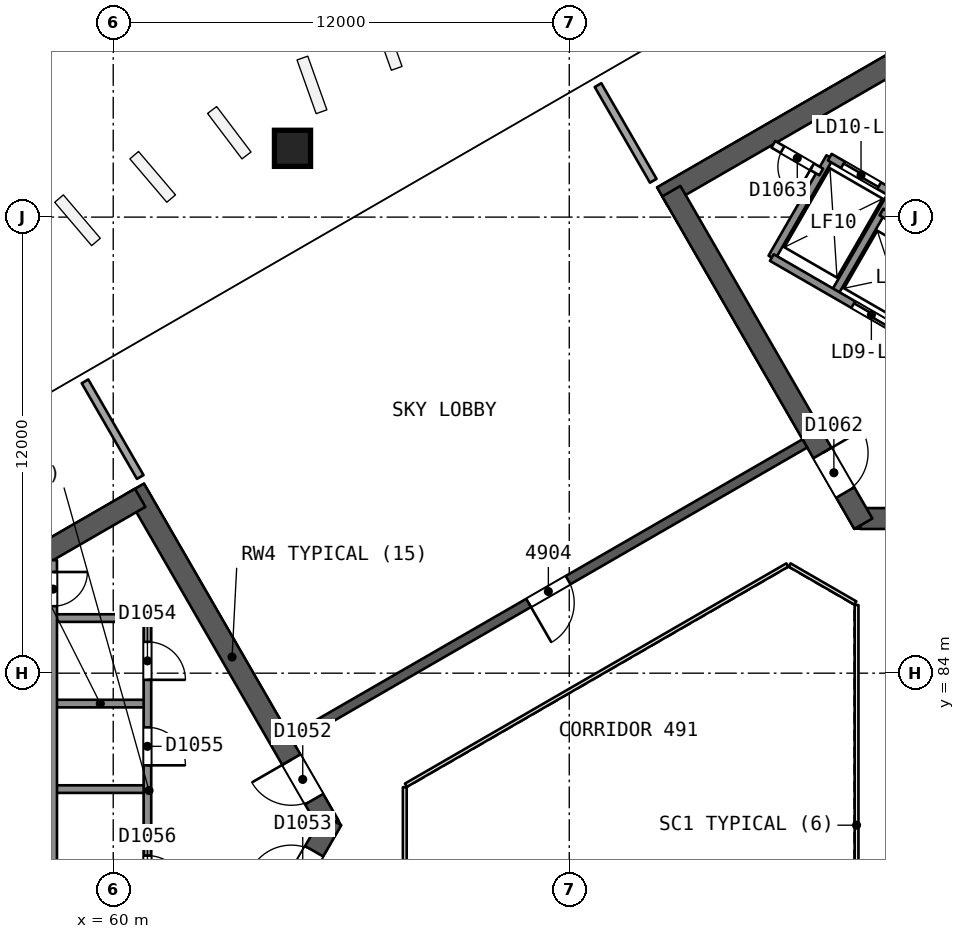
"""IFC4 building model, lengths in metres.
Left out: names, types, materials, properties, quantities, classifications, styles, units other than length and angle.
Written with IfcOpenShell. Run it as: python <this file> out.ifc"""

import sys

from ifc_helpers import new_model, si_unit, direction, frame, frame_2d, origin, origin_2d, place, context, subcontext, project, spatial, rectangle, extrude, element, fill, save


model = new_model("IFC4")
c1 = context("Model", 3, precision=1e-05, world=origin(), true_north=direction((0.0, 1.0)))
c2 = subcontext(c1, "Body", "Model", "MODEL_VIEW")
j1 = project(units=[si_unit("LENGTHUNIT", "METRE"), si_unit("PLANEANGLEUNIT", "RADIAN")], contexts=[c1])
p1 = place(None, origin())
s1 = spatial("IfcSite", under=j1, at=p1, CompositionType="ELEMENT")
p2 = place(p1, origin())
s2 = spatial("IfcBuilding", under=s1, at=p2, CompositionType="ELEMENT")
p3 = place(p2, frame((0.0, 0.0, 201.4)))
s3 = spatial("IfcBuildingStorey", under=s2, at=p3, CompositionType="ELEMENT", Elevation=201.4)
p4 = place(p3, frame((65.682, 80.0, 0.0), z_axis=(0.0, 0.0, 1.0), x_axis=(-0.500000202252, 0.866025287014, 0.0)))
e1 = element("IfcWall", 1, at=p4, inside=s3, PredefinedType="SHEAR", context=c2, shape_type="SweptSolid", body=[
    extrude(rectangle(XDim=10.221, YDim=0.55, at=frame_2d((5.111, 0.0))), origin(), (0.0, 0.0, 1.0), 4.4),
])
p5 = place(p4, frame((0.791, 0.0, 0.0)))
e2 = element("IfcOpeningElement", 2, at=p5, cuts=e1, PredefinedType="OPENING", context=c2, shape_type="SweptSolid", body=[
    extrude(rectangle(XDim=1.2, YDim=2.1, at=frame_2d((0.6, 1.05))), frame((0.0, 0.286, 0.0), z_axis=(0.0, -1.0, 0.0), x_axis=(1.0, 0.0, 0.0)), (0.0, 0.0, 1.0), 0.571),
])
p6 = place(p3, frame((60.709, 88.614, 0.0), z_axis=(0.0, 0.0, 1.0), x_axis=(-0.866020164116, -0.500009075263, 0.0)))
e3 = element("IfcWall", 3, at=p6, inside=s3, PredefinedType="SHEAR", context=c2, shape_type="SweptSolid", body=[
    extrude(rectangle(XDim=14.058, YDim=0.55, at=frame_2d((7.029, 0.0))), origin(), (0.0, 0.0, 1.0), 4.4),
])
p7 = place(p3, frame((60.709, 71.386, 0.0), z_axis=(0.0, 0.0, 1.0), x_axis=(0.500015938302, 0.866016201606, 0.0)))
e4 = element("IfcWall", 4, at=p7, inside=s3, PredefinedType="SHEAR", context=c2, shape_type="SweptSolid", body=[
    extrude(rectangle(XDim=10.105, YDim=0.55, at=frame_2d((5.053, 0.0))), origin(), (0.0, 0.0, 1.0), 4.4),
])
p8 = place(p7, frame((7.955, 0.0, 0.0)))
e5 = element("IfcOpeningElement", 5, at=p8, cuts=e4, PredefinedType="OPENING", context=c2, shape_type="SweptSolid", body=[
    extrude(rectangle(XDim=1.2, YDim=2.1, at=frame_2d((0.6, 1.05))), frame((0.0, 0.286, 0.0), z_axis=(0.0, -1.0, 0.0), x_axis=(1.0, 0.0, 0.0)), (0.0, 0.0, 1.0), 0.571),
])
p9 = place(p3, frame((79.659, 88.069, 0.0), z_axis=(0.0, 0.0, 1.0), x_axis=(1.0, 0.0, 0.0)))
e6 = element("IfcWall", 6, at=p9, inside=s3, PredefinedType="SHEAR", context=c2, shape_type="SweptSolid", body=[
    extrude(rectangle(XDim=10.221, YDim=0.55, at=frame_2d((5.111, 0.0))), origin(), (0.0, 0.0, 1.0), 4.4),
])
p10 = place(p9, frame((0.791, 0.0, 0.0)))
e7 = element("IfcOpeningElement", 7, at=p10, cuts=e6, PredefinedType="OPENING", context=c2, shape_type="SweptSolid", body=[
    extrude(rectangle(XDim=1.2, YDim=2.1, at=frame_2d((0.6, 1.05))), frame((0.0, 0.286, 0.0), z_axis=(0.0, -1.0, 0.0), x_axis=(1.0, 0.0, 0.0)), (0.0, 0.0, 1.0), 0.571),
])
p11 = place(p3, frame((86.723, 103.633, 0.0), z_axis=(0.0, 0.0, 1.0), x_axis=(-0.866023530946, -0.500003243837, 0.0)))
e8 = element("IfcWall", 8, at=p11, inside=s3, PredefinedType="SHEAR", context=c2, shape_type="SweptSolid", body=[
    extrude(rectangle(XDim=14.175, YDim=0.55, at=frame_2d((7.087, 0.0))), origin(), (0.0, 0.0, 1.0), 4.4),
])
p12 = place(p3, frame((74.686, 96.683, 0.0), z_axis=(0.0, 0.0, 1.0), x_axis=(0.499997818338, -0.866026663364, 0.0)))
e9 = element("IfcWall", 9, at=p12, inside=s3, PredefinedType="SHEAR", context=c2, shape_type="SweptSolid", body=[
    extrude(rectangle(XDim=10.105, YDim=0.55, at=frame_2d((5.052, 0.0))), origin(), (0.0, 0.0, 1.0), 4.4),
])
p13 = place(p12, frame((7.955, 0.0, 0.0)))
e10 = element("IfcOpeningElement", 10, at=p13, cuts=e9, PredefinedType="OPENING", context=c2, shape_type="SweptSolid", body=[
    extrude(rectangle(XDim=1.2, YDim=2.1, at=frame_2d((0.6, 1.05))), frame((0.0, 0.286, 0.0), z_axis=(0.0, -1.0, 0.0), x_axis=(1.0, 0.0, 0.0)), (0.0, 0.0, 1.0), 0.571),
])
p14 = place(p3, frame((78.2, 90.046, 0.0), z_axis=(0.0, 0.0, 1.0), x_axis=(-0.866026492143, -0.499998114903, 0.0)))
e11 = element("IfcWall", 11, at=p14, inside=s3, PredefinedType="SHEAR", context=c2, shape_type="SweptSolid", body=[
    extrude(rectangle(XDim=15.588, YDim=0.25, at=frame_2d((7.794, 0.0))), origin(), (0.0, 0.0, 1.0), 4.0),
])
p15 = place(p14, frame((7.194, 0.0, 0.0)))
e12 = element("IfcOpeningElement", 12, at=p15, cuts=e11, PredefinedType="OPENING", context=c2, shape_type="SweptSolid", body=[
    extrude(rectangle(XDim=1.2, YDim=2.4, at=frame_2d((0.6, 1.2))), frame((0.0, 0.135, 0.0), z_axis=(0.0, -1.0, 0.0), x_axis=(1.0, 0.0, 0.0)), (0.0, 0.0, 1.0), 0.271),
])
p16 = place(p3, frame((64.705, 97.831, 0.0), z_axis=(0.010096151254, -0.017474107939, 0.999796340902), x_axis=(-0.500171963961, 0.865690897347, 0.020181098047)))
e13 = element("IfcColumn", 13, at=p16, inside=s3, PredefinedType="COLUMN", context=c2, shape_type="SweptSolid", body=[
    extrude(rectangle(XDim=0.95, YDim=0.95, at=origin_2d()), origin(), (0.0, 0.0, 1.0), 4.401),
])
for number, where, z_axis, x_axis in (
    (14, (60.71, 89.162, 0.0), (0.0, 0.0, 1.0), (-0.5, 0.866, 0.0)),
    (15, (72.757, 99.473, 0.0), (0.0, 0.0, 1.0), (0.5, -0.866, 0.0)),
):
    element("IfcWall", number, at=place(p3, frame(where, z_axis=z_axis, x_axis=x_axis)), inside=s3, PredefinedType="PARTITIONING", context=c2, shape_type="SweptSolid", body=[
        extrude(rectangle(XDim=2.907, YDim=0.2, at=frame_2d((1.453, 0.0))), origin(), (0.0, 0.0, 1.0), 4.0),
    ])
for number, where, z_axis, x_axis in (
    (16, (60.9, 85.45, 0.0), (0.0, 0.0, 1.0), (-1.0, 0.0, 0.0)),
    (17, (60.9, 83.2, 0.0), (0.0, 0.0, 1.0), (-1.0, 0.0, 0.0)),
):
    element("IfcWall", number, at=place(p3, frame(where, z_axis=z_axis, x_axis=x_axis)), inside=s3, PredefinedType="SOLIDWALL", context=c2, shape_type="SweptSolid", body=[
        extrude(rectangle(XDim=2.48, YDim=0.2, at=frame_2d((1.24, 0.0))), origin(), (0.0, 0.0, 1.0), 4.0),
    ])
p17 = place(p3, frame((58.42, 82.075, 0.0), z_axis=(0.0, 0.0, 1.0), x_axis=(-1.0, 0.0, 0.0)))
e18 = element("IfcWall", 18, at=p17, inside=s3, PredefinedType="SOLIDWALL", context=c2, shape_type="SweptSolid", body=[
    extrude(rectangle(XDim=7.7, YDim=0.2, at=frame_2d((3.85, 0.0))), origin(), (0.0, 0.0, 1.0), 4.0),
])
p18 = place(p3, frame((60.9, 80.95, 0.0), z_axis=(0.0, 0.0, 1.0), x_axis=(-1.0, 0.0, 0.0)))
e19 = element("IfcWall", 19, at=p18, inside=s3, PredefinedType="SOLIDWALL", context=c2, shape_type="SweptSolid", body=[
    extrude(rectangle(XDim=2.48, YDim=0.2, at=frame_2d((1.24, 0.0))), origin(), (0.0, 0.0, 1.0), 4.0),
])
p19 = place(p3, frame((60.9, 85.45, 0.0), z_axis=(0.0, 0.0, 1.0), x_axis=(0.0, -1.0, 0.0)))
e20 = element("IfcWall", 20, at=p19, inside=s3, PredefinedType="SOLIDWALL", context=c2, shape_type="SweptSolid", body=[
    extrude(rectangle(XDim=10.9, YDim=0.2, at=frame_2d((5.45, 0.0))), origin(), (0.0, 0.0, 1.0), 4.0),
])
p20 = place(p19, frame((0.625, 0.0, 0.0)))
e21 = element("IfcOpeningElement", 21, at=p20, cuts=e20, PredefinedType="OPENING", context=c2, shape_type="SweptSolid", body=[
    extrude(rectangle(XDim=1.0, YDim=2.1, at=frame_2d((0.5, 1.05))), frame((0.0, 0.11, 0.0), z_axis=(0.0, -1.0, 0.0), x_axis=(1.0, 0.0, 0.0)), (0.0, 0.0, 1.0), 0.221),
])
p21 = place(p19, frame((2.875, 0.0, 0.0)))
e22 = element("IfcOpeningElement", 22, at=p21, cuts=e20, PredefinedType="OPENING", context=c2, shape_type="SweptSolid", body=[
    extrude(rectangle(XDim=1.0, YDim=2.1, at=frame_2d((0.5, 1.05))), frame((0.0, 0.11, 0.0), z_axis=(0.0, -1.0, 0.0), x_axis=(1.0, 0.0, 0.0)), (0.0, 0.0, 1.0), 0.221),
])
p22 = place(p19, frame((6.25, 0.0, 0.0)))
e23 = element("IfcOpeningElement", 23, at=p22, cuts=e20, PredefinedType="OPENING", context=c2, shape_type="SweptSolid", body=[
    extrude(rectangle(XDim=1.0, YDim=2.1, at=frame_2d((0.5, 1.05))), frame((0.0, 0.11, 0.0), z_axis=(0.0, -1.0, 0.0), x_axis=(1.0, 0.0, 0.0)), (0.0, 0.0, 1.0), 0.221),
])
p23 = place(p3, frame((58.42, 86.974, 0.0), z_axis=(0.0, 0.0, 1.0), x_axis=(0.0, -1.0, 0.0)))
e24 = element("IfcWall", 24, at=p23, inside=s3, PredefinedType="SOLIDWALL", context=c2, shape_type="SweptSolid", body=[
    extrude(rectangle(XDim=10.524, YDim=0.2, at=frame_2d((5.262, 0.0))), origin(), (0.0, 0.0, 1.0), 4.0),
])
p24 = place(p23, frame((0.312, 0.0, 0.0)))
e25 = element("IfcOpeningElement", 25, at=p24, cuts=e24, PredefinedType="OPENING", context=c2, shape_type="SweptSolid", body=[
    extrude(rectangle(XDim=0.9, YDim=2.1, at=frame_2d((0.45, 1.05))), frame((0.0, 0.11, 0.0), z_axis=(0.0, -1.0, 0.0), x_axis=(1.0, 0.0, 0.0)), (0.0, 0.0, 1.0), 0.221),
])
for number, where, z_axis, x_axis in (
    (26, (78.976, 93.986, 0.0), (0.0, 0.0, 1.0), (0.5, 0.866, 0.0)),
    (27, (77.33, 94.936, 0.0), (0.0, 0.0, 1.0), (0.5, 0.866, 0.0)),
):
    element("IfcWall", number, at=place(p3, frame(where, z_axis=z_axis, x_axis=x_axis)), inside=s3, PredefinedType="SOLIDWALL", context=c2, shape_type="SweptSolid", body=[
        extrude(rectangle(XDim=3.05, YDim=0.2, at=frame_2d((1.525, 0.0))), origin(), (0.0, 0.0, 1.0), 4.0),
    ])
p25 = place(p3, frame((86.77, 89.486, 0.0), z_axis=(0.0, 0.0, 1.0), x_axis=(-0.86601811187, 0.500012629753, 0.0)))
e28 = element("IfcWall", 28, at=p25, inside=s3, PredefinedType="SOLIDWALL", context=c2, shape_type="SweptSolid", body=[
    extrude(rectangle(XDim=10.9, YDim=0.2, at=frame_2d((5.45, 0.0))), origin(), (0.0, 0.0, 1.0), 4.0),
])
p26 = place(p25, frame((0.575, 0.0, 0.0)))
e29 = element("IfcOpeningElement", 29, at=p26, cuts=e28, PredefinedType="OPENING", context=c2, shape_type="SweptSolid", body=[
    extrude(rectangle(XDim=1.1, YDim=2.1, at=frame_2d((0.55, 1.05))), frame((0.0, 0.11, 0.0), z_axis=(0.0, -1.0, 0.0), x_axis=(1.0, 0.0, 0.0)), (0.0, 0.0, 1.0), 0.221),
])
p27 = place(p25, frame((2.825, 0.0, 0.0)))
e30 = element("IfcOpeningElement", 30, at=p27, cuts=e28, PredefinedType="OPENING", context=c2, shape_type="SweptSolid", body=[
    extrude(rectangle(XDim=1.1, YDim=2.1, at=frame_2d((0.55, 1.05))), frame((0.0, 0.11, 0.0), z_axis=(0.0, -1.0, 0.0), x_axis=(1.0, 0.0, 0.0)), (0.0, 0.0, 1.0), 0.221),
])
p28 = place(p25, frame((5.075, 0.0, 0.0)))
e31 = element("IfcOpeningElement", 31, at=p28, cuts=e28, PredefinedType="OPENING", context=c2, shape_type="SweptSolid", body=[
    extrude(rectangle(XDim=1.1, YDim=2.1, at=frame_2d((0.55, 1.05))), frame((0.0, 0.11, 0.0), z_axis=(0.0, -1.0, 0.0), x_axis=(1.0, 0.0, 0.0)), (0.0, 0.0, 1.0), 0.221),
])
p29 = place(p25, frame((7.325, 0.0, 0.0)))
e32 = element("IfcOpeningElement", 32, at=p29, cuts=e28, PredefinedType="OPENING", context=c2, shape_type="SweptSolid", body=[
    extrude(rectangle(XDim=1.1, YDim=2.1, at=frame_2d((0.55, 1.05))), frame((0.0, 0.11, 0.0), z_axis=(0.0, -1.0, 0.0), x_axis=(1.0, 0.0, 0.0)), (0.0, 0.0, 1.0), 0.221),
])
p30 = place(p3, frame((89.33, 90.872, 0.0), z_axis=(0.0, 0.0, 1.0), x_axis=(-0.866027589512, 0.49999621419, 0.0)))
e33 = element("IfcWall", 33, at=p30, inside=s3, PredefinedType="SOLIDWALL", context=c2, shape_type="SweptSolid", body=[
    extrude(rectangle(XDim=10.524, YDim=0.2, at=frame_2d((5.262, 0.0))), origin(), (0.0, 0.0, 1.0), 4.0),
])
p31 = place(p30, frame((0.312, 0.0, 0.0)))
e34 = element("IfcOpeningElement", 34, at=p31, cuts=e33, PredefinedType="OPENING", context=c2, shape_type="SweptSolid", body=[
    extrude(rectangle(XDim=0.9, YDim=2.1, at=frame_2d((0.45, 1.05))), frame((0.0, 0.11, 0.0), z_axis=(0.0, -1.0, 0.0), x_axis=(1.0, 0.0, 0.0)), (0.0, 0.0, 1.0), 0.221),
])
p32 = place(p3, frame((78.63, 97.188, 0.0), z_axis=(0.0, 0.0, 1.0), x_axis=(-0.866003949776, 0.500037157592, 0.0)))
e35 = element("IfcWall", 35, at=p32, inside=s3, PredefinedType="PARTITIONING", context=c2, shape_type="SweptSolid", body=[
    extrude(rectangle(XDim=1.455, YDim=0.2, at=frame_2d((0.728, 0.0))), origin(), (0.0, 0.0, 1.0), 4.0),
])
p33 = place(p32, frame((0.278, 0.0, 0.0)))
e36 = element("IfcOpeningElement", 36, at=p33, cuts=e35, PredefinedType="OPENING", context=c2, shape_type="SweptSolid", body=[
    extrude(rectangle(XDim=0.9, YDim=2.1, at=frame_2d((0.45, 1.05))), frame((0.0, 0.11, 0.0), z_axis=(0.0, -1.0, 0.0), x_axis=(1.0, 0.0, 0.0)), (0.0, 0.0, 1.0), 0.221),
])
p34 = place(p3, frame((80.5, 96.627, 0.0), z_axis=(0.0, 0.0, 1.0), x_axis=(-0.86601224135, 0.500022797313, 0.0)))
e37 = element("IfcWall", 37, at=p34, inside=s3, PredefinedType="SOLIDWALL", context=c2, shape_type="SweptSolid", body=[
    extrude(rectangle(XDim=1.9, YDim=0.2, at=frame_2d((0.95, 0.0))), origin(), (0.0, 0.0, 1.0), 4.0),
])
p35 = place(p34, frame((0.4, 0.0, 0.0)))
e38 = element("IfcOpeningElement", 38, at=p35, cuts=e37, PredefinedType="OPENING", context=c2, shape_type="SweptSolid", body=[
    extrude(rectangle(XDim=1.1, YDim=2.1, at=frame_2d((0.55, 1.05))), frame((0.0, 0.11, 0.0), z_axis=(0.0, -1.0, 0.0), x_axis=(1.0, 0.0, 0.0)), (0.0, 0.0, 1.0), 0.221),
])
p36 = place(p3, frame((79.56, 74.206, 0.0), z_axis=(0.0, 0.0, 1.0), x_axis=(0.0, 1.0, 0.0)))
e39 = element("IfcWall", 39, at=p36, inside=s3, PredefinedType="PARTITIONING", context=c2, shape_type="SweptSolid", body=[
    extrude(rectangle(XDim=11.588, YDim=0.1, at=frame_2d((5.794, 0.0))), origin(), (0.0, 0.0, 1.0), 4.0),
])
p37 = place(p3, frame((79.53, 85.846, 0.0), z_axis=(0.0, 0.0, 1.0), x_axis=(-0.866041268327, 0.499972520799, 0.0)))
e40 = element("IfcWall", 40, at=p37, inside=s3, PredefinedType="PARTITIONING", context=c2, shape_type="SweptSolid", body=[
    extrude(rectangle(XDim=2.0, YDim=0.1, at=frame_2d((1.0, 0.0))), origin(), (0.0, 0.0, 1.0), 4.0),
])
p38 = place(p3, frame((77.738, 86.846, 0.0), z_axis=(0.0, 0.0, 1.0), x_axis=(-0.866026658274, -0.499997827154, 0.0)))
e41 = element("IfcWall", 41, at=p38, inside=s3, PredefinedType="PARTITIONING", context=c2, shape_type="SweptSolid", body=[
    extrude(rectangle(XDim=11.588, YDim=0.1, at=frame_2d((5.794, 0.0))), origin(), (0.0, 0.0, 1.0), 4.0),
])
p39 = place(p3, frame((67.672, 81.0, 0.0), z_axis=(0.0, 0.0, 1.0), x_axis=(0.0, -1.0, 0.0)))
e42 = element("IfcWall", 42, at=p39, inside=s3, PredefinedType="PARTITIONING", context=c2, shape_type="SweptSolid", body=[
    extrude(rectangle(XDim=2.0, YDim=0.1, at=frame_2d((1.0, 0.0))), origin(), (0.0, 0.0, 1.0), 4.0),
])
p40 = place(p15, origin())
e43 = element("IfcDoor", 43, at=p40, inside=s3, OperationType="SINGLE_SWING_RIGHT", PredefinedType="NOTDEFINED", context=c2, shape_type="SweptSolid", body=[
    extrude(rectangle(XDim=1.2, YDim=2.4, at=frame_2d((0.6, 1.2))), frame((0.0, 0.025, 0.0), z_axis=(0.0, -1.0, 0.0), x_axis=(1.0, 0.0, 0.0)), (0.0, 0.0, 1.0), 0.05),
])
fill(e12, e43)
p41 = place(p5, origin())
e44 = element("IfcDoor", 44, at=p41, inside=s3, OperationType="SINGLE_SWING_RIGHT", PredefinedType="NOTDEFINED", context=c2, shape_type="SweptSolid", body=[
    extrude(rectangle(XDim=1.2, YDim=2.1, at=frame_2d((0.6, 1.05))), frame((0.0, 0.025, 0.0), z_axis=(0.0, -1.0, 0.0), x_axis=(1.0, 0.0, 0.0)), (0.0, 0.0, 1.0), 0.05),
])
fill(e2, e44)
p42 = place(p8, origin())
e45 = element("IfcDoor", 45, at=p42, inside=s3, OperationType="SINGLE_SWING_LEFT", PredefinedType="NOTDEFINED", context=c2, shape_type="SweptSolid", body=[
    extrude(rectangle(XDim=1.2, YDim=2.1, at=frame_2d((0.6, 1.05))), frame((0.0, 0.025, 0.0), z_axis=(0.0, -1.0, 0.0), x_axis=(1.0, 0.0, 0.0)), (0.0, 0.0, 1.0), 0.05),
])
fill(e5, e45)
p43 = place(p20, origin())
e46 = element("IfcDoor", 46, at=p43, inside=s3, OperationType="SINGLE_SWING_RIGHT", PredefinedType="NOTDEFINED", context=c2, shape_type="SweptSolid", body=[
    extrude(rectangle(XDim=1.0, YDim=2.1, at=frame_2d((0.5, 1.05))), frame((0.0, 0.025, 0.0), z_axis=(0.0, -1.0, 0.0), x_axis=(1.0, 0.0, 0.0)), (0.0, 0.0, 1.0), 0.05),
])
fill(e21, e46)
p44 = place(p21, origin())
e47 = element("IfcDoor", 47, at=p44, inside=s3, OperationType="SINGLE_SWING_RIGHT", PredefinedType="NOTDEFINED", context=c2, shape_type="SweptSolid", body=[
    extrude(rectangle(XDim=1.0, YDim=2.1, at=frame_2d((0.5, 1.05))), frame((0.0, 0.025, 0.0), z_axis=(0.0, -1.0, 0.0), x_axis=(1.0, 0.0, 0.0)), (0.0, 0.0, 1.0), 0.05),
])
fill(e22, e47)
p45 = place(p22, origin())
e48 = element("IfcDoor", 48, at=p45, inside=s3, OperationType="SINGLE_SWING_RIGHT", PredefinedType="NOTDEFINED", context=c2, shape_type="SweptSolid", body=[
    extrude(rectangle(XDim=1.0, YDim=2.1, at=frame_2d((0.5, 1.05))), frame((0.0, 0.025, 0.0), z_axis=(0.0, -1.0, 0.0), x_axis=(1.0, 0.0, 0.0)), (0.0, 0.0, 1.0), 0.05),
])
fill(e23, e48)
p46 = place(p24, origin())
e49 = element("IfcDoor", 49, at=p46, inside=s3, OperationType="SINGLE_SWING_LEFT", PredefinedType="NOTDEFINED", context=c2, shape_type="SweptSolid", body=[
    extrude(rectangle(XDim=0.9, YDim=2.1, at=frame_2d((0.45, 1.05))), frame((0.0, 0.025, 0.0), z_axis=(0.0, -1.0, 0.0), x_axis=(1.0, 0.0, 0.0)), (0.0, 0.0, 1.0), 0.05),
])
fill(e25, e49)
p47 = place(p13, origin())
e50 = element("IfcDoor", 50, at=p47, inside=s3, OperationType="SINGLE_SWING_LEFT", PredefinedType="NOTDEFINED", context=c2, shape_type="SweptSolid", body=[
    extrude(rectangle(XDim=1.2, YDim=2.1, at=frame_2d((0.6, 1.05))), frame((0.0, 0.025, 0.0), z_axis=(0.0, -1.0, 0.0), x_axis=(1.0, 0.0, 0.0)), (0.0, 0.0, 1.0), 0.05),
])
fill(e10, e50)
p48 = place(p29, origin())
e51 = element("IfcDoor", 51, at=p48, inside=s3, OperationType="SLIDING_TO_LEFT", PredefinedType="NOTDEFINED", context=c2, shape_type="SweptSolid", body=[
    extrude(rectangle(XDim=1.1, YDim=2.1, at=frame_2d((0.55, 1.05))), frame((0.0, 0.025, 0.0), z_axis=(0.0, -1.0, 0.0), x_axis=(1.0, 0.0, 0.0)), (0.0, 0.0, 1.0), 0.05),
])
fill(e32, e51)
p49 = place(p35, origin())
e52 = element("IfcDoor", 52, at=p49, inside=s3, OperationType="SLIDING_TO_RIGHT", PredefinedType="NOTDEFINED", context=c2, shape_type="SweptSolid", body=[
    extrude(rectangle(XDim=1.1, YDim=2.1, at=frame_2d((0.55, 1.05))), frame((0.0, 0.025, 0.0), z_axis=(0.0, -1.0, 0.0), x_axis=(1.0, 0.0, 0.0)), (0.0, 0.0, 1.0), 0.05),
])
fill(e38, e52)
p50 = place(p33, origin())
e53 = element("IfcDoor", 53, at=p50, inside=s3, OperationType="SINGLE_SWING_LEFT", PredefinedType="NOTDEFINED", context=c2, shape_type="SweptSolid", body=[
    extrude(rectangle(XDim=0.9, YDim=2.1, at=frame_2d((0.45, 1.05))), frame((0.0, 0.025, 0.0), z_axis=(0.0, -1.0, 0.0), x_axis=(1.0, 0.0, 0.0)), (0.0, 0.0, 1.0), 0.05),
])
fill(e36, e53)
save(model, sys.argv[1])
